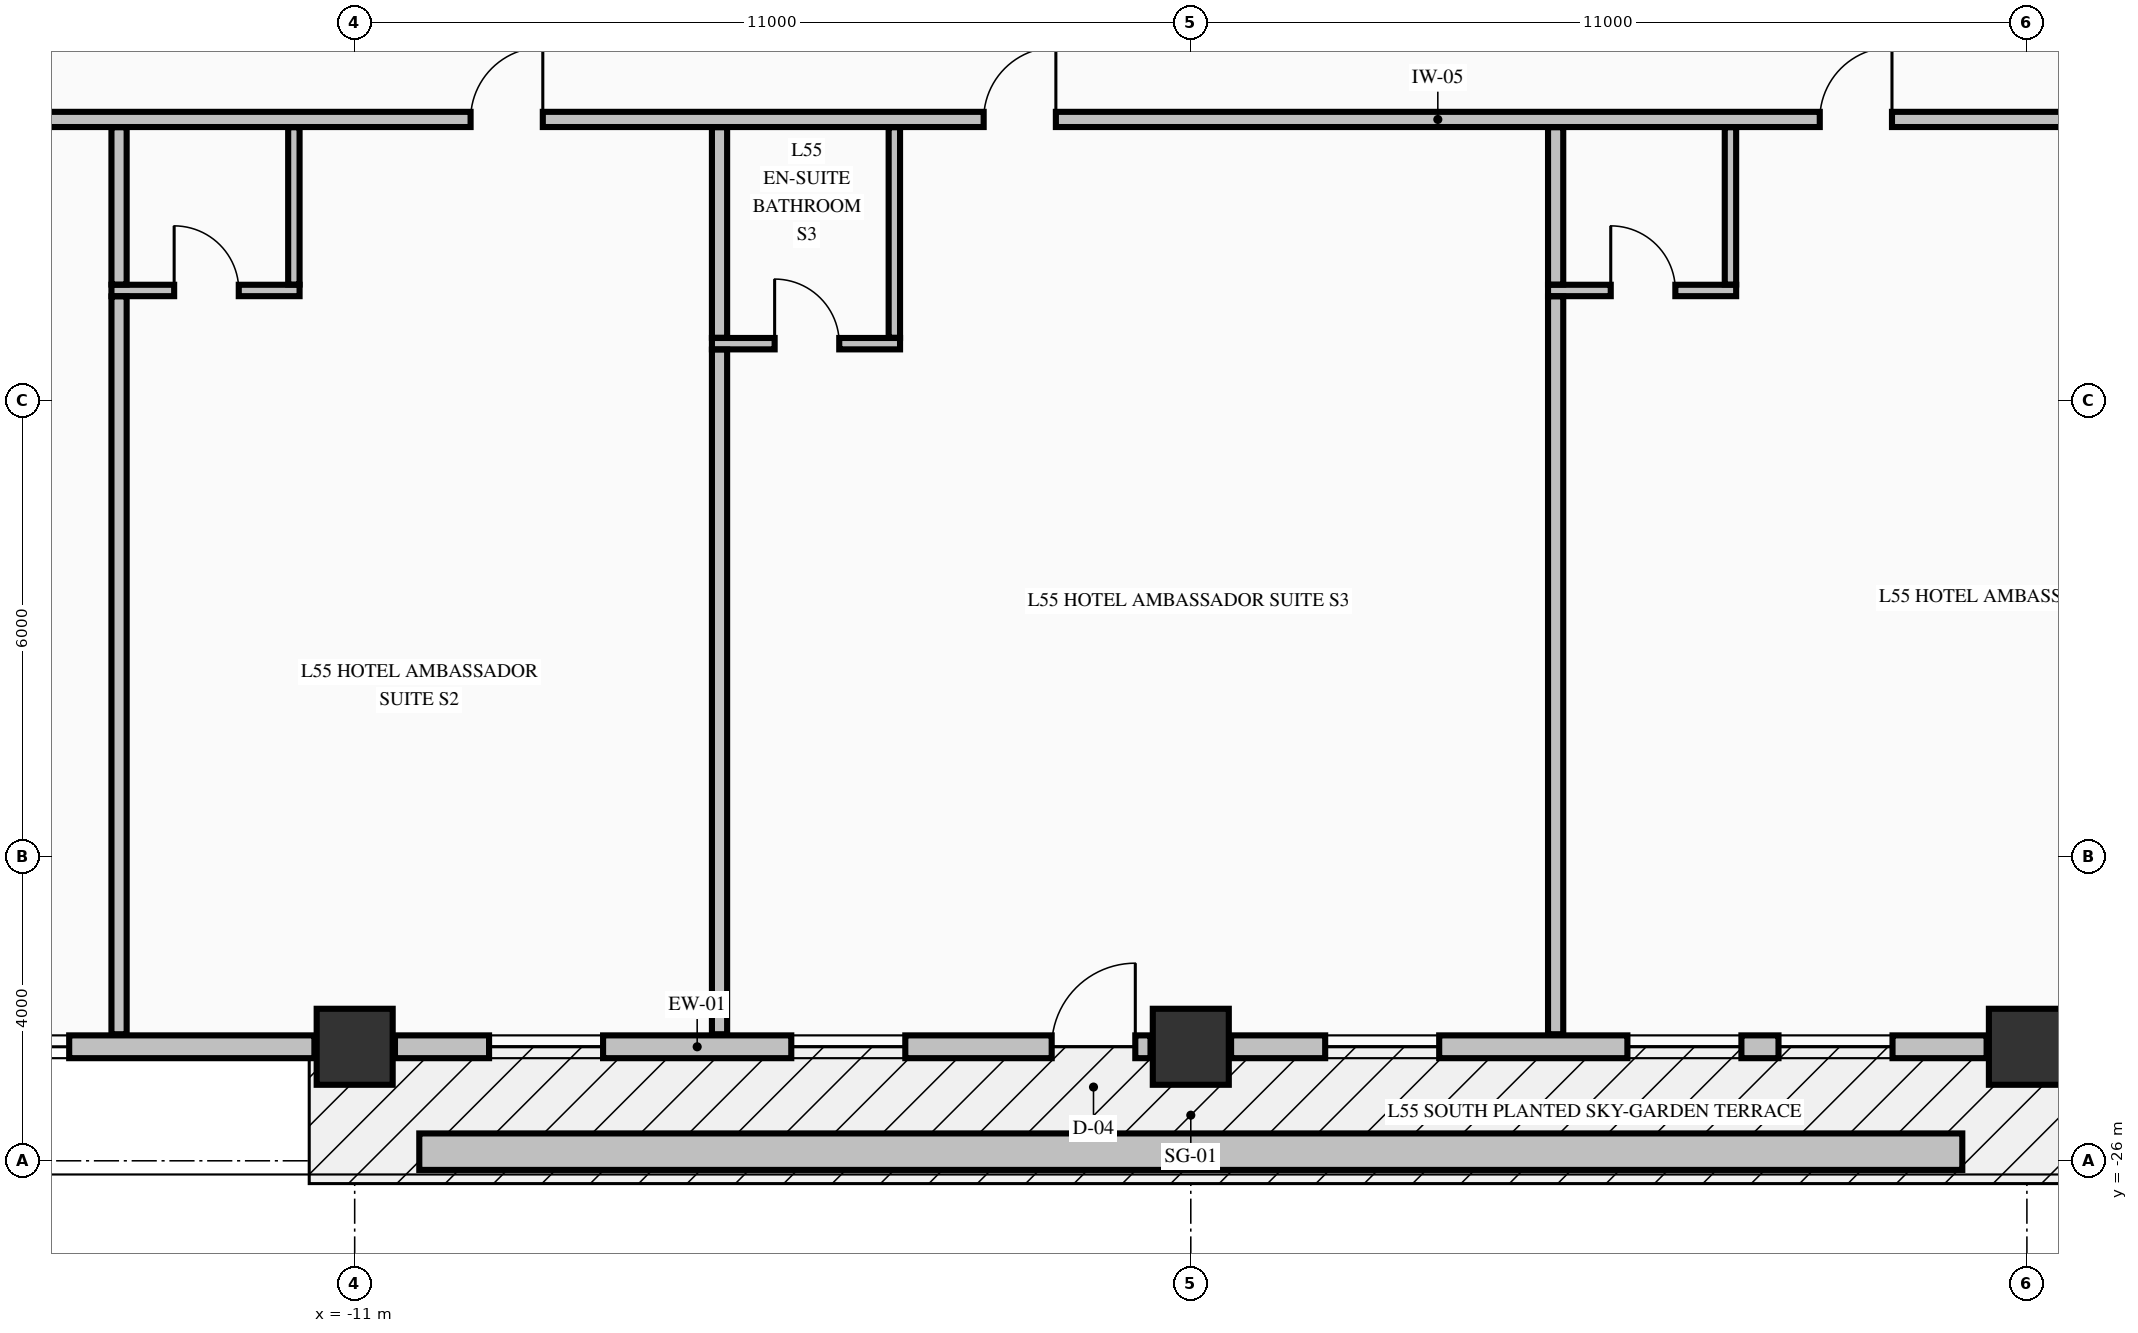
"""IFC4 building model, lengths in metres.
Left out: names, types, materials, properties, quantities, classifications, styles, units other than length and angle.
Written with IfcOpenShell. Run it as: python <this file> out.ifc"""

import sys

from ifc_helpers import new_model, si_unit, direction, frame, frame_2d, origin, origin_2d, place, context, subcontext, project, spatial, rectangle, extrude, element, fill, save


model = new_model("IFC4")
c1 = context("Model", 3, precision=1e-05, world=origin(), true_north=direction((0.0, 1.0)))
c2 = subcontext(c1, "Body", "Model", "MODEL_VIEW")
j1 = project(units=[si_unit("LENGTHUNIT", "METRE"), si_unit("PLANEANGLEUNIT", "RADIAN")], contexts=[c1])
p1 = place(None, origin())
s1 = spatial("IfcSite", under=j1, at=p1, CompositionType="ELEMENT")
p2 = place(p1, origin())
s2 = spatial("IfcBuilding", under=s1, at=p2, CompositionType="ELEMENT")
p3 = place(p2, frame((0.0, 0.0, 211.86)))
s3 = spatial("IfcBuildingStorey", under=s2, at=p3, CompositionType="ELEMENT", Elevation=211.86)
for number, where, z_axis, x_axis in (
    (1, (-11.0, -24.5, -0.325), (0.0, 0.0, 1.0), (1.0, 0.0, 0.0)),
    (2, (0.0, -24.5, -0.325), (0.0, 0.0, 1.0), (1.0, 0.0, 0.0)),
    (3, (11.0, -24.5, -0.325), (0.0, 0.0, 1.0), (1.0, 0.0, 0.0)),
):
    element("IfcColumn", number, at=place(p3, frame(where, z_axis=z_axis, x_axis=x_axis)), inside=s3, PredefinedType="COLUMN", context=c2, shape_type="SweptSolid", body=[
        extrude(rectangle(XDim=1.0, YDim=1.0, at=origin_2d()), origin(), (0.0, 0.0, 1.0), 3.475),
    ])
p4 = place(p3, frame((-21.47, -24.5, 0.0), z_axis=(0.0, 0.0, 1.0), x_axis=(1.0, 0.0, 0.0)))
e4 = element("IfcWall", 4, at=p4, inside=s3, PredefinedType="STANDARD", context=c2, shape_type="SweptSolid", body=[
    extrude(rectangle(XDim=9.94, YDim=0.3, at=frame_2d((4.97, 0.0))), origin(), (0.0, 0.0, 1.0), 2.542),
])
p5 = place(p4, frame((3.226, 0.0, 0.72)))
e5 = element("IfcOpeningElement", 5, at=p5, cuts=e4, PredefinedType="OPENING", context=c2, shape_type="SweptSolid", body=[
    extrude(rectangle(XDim=1.5, YDim=1.6, at=frame_2d((0.75, 0.8))), frame((0.0, 0.16, 0.0), z_axis=(0.0, -1.0, 0.0), x_axis=(1.0, 0.0, 0.0)), (0.0, 0.0, 1.0), 0.32),
])
p6 = place(p4, frame((5.214, 0.0, 0.72)))
e6 = element("IfcOpeningElement", 6, at=p6, cuts=e4, PredefinedType="OPENING", context=c2, shape_type="SweptSolid", body=[
    extrude(rectangle(XDim=1.5, YDim=1.6, at=frame_2d((0.75, 0.8))), frame((0.0, 0.16, 0.0), z_axis=(0.0, -1.0, 0.0), x_axis=(1.0, 0.0, 0.0)), (0.0, 0.0, 1.0), 0.32),
])
p7 = place(p3, frame((-10.47, -24.5, 0.0), z_axis=(0.0, 0.0, 1.0), x_axis=(1.0, 0.0, 0.0)))
e7 = element("IfcWall", 7, at=p7, inside=s3, PredefinedType="STANDARD", context=c2, shape_type="SweptSolid", body=[
    extrude(rectangle(XDim=9.94, YDim=0.3, at=frame_2d((4.97, 0.0))), origin(), (0.0, 0.0, 1.0), 2.542),
])
p8 = place(p7, frame((8.64, 0.0, 0.0)))
e8 = element("IfcOpeningElement", 8, at=p8, cuts=e7, PredefinedType="OPENING", context=c2, shape_type="SweptSolid", body=[
    extrude(rectangle(XDim=1.1, YDim=2.15, at=frame_2d((0.55, 1.075))), frame((0.0, 0.16, 0.0), z_axis=(0.0, -1.0, 0.0), x_axis=(1.0, 0.0, 0.0)), (0.0, 0.0, 1.0), 0.32),
])
p9 = place(p7, frame((1.238, 0.0, 0.72)))
e9 = element("IfcOpeningElement", 9, at=p9, cuts=e7, PredefinedType="OPENING", context=c2, shape_type="SweptSolid", body=[
    extrude(rectangle(XDim=1.5, YDim=1.6, at=frame_2d((0.75, 0.8))), frame((0.0, 0.16, 0.0), z_axis=(0.0, -1.0, 0.0), x_axis=(1.0, 0.0, 0.0)), (0.0, 0.0, 1.0), 0.32),
])
p10 = place(p7, frame((5.214, 0.0, 0.72)))
e10 = element("IfcOpeningElement", 10, at=p10, cuts=e7, PredefinedType="OPENING", context=c2, shape_type="SweptSolid", body=[
    extrude(rectangle(XDim=1.5, YDim=1.6, at=frame_2d((0.75, 0.8))), frame((0.0, 0.16, 0.0), z_axis=(0.0, -1.0, 0.0), x_axis=(1.0, 0.0, 0.0)), (0.0, 0.0, 1.0), 0.32),
])
p11 = place(p3, frame((0.53, -24.5, 0.0), z_axis=(0.0, 0.0, 1.0), x_axis=(1.0, 0.0, 0.0)))
e11 = element("IfcWall", 11, at=p11, inside=s3, PredefinedType="STANDARD", context=c2, shape_type="SweptSolid", body=[
    extrude(rectangle(XDim=9.94, YDim=0.3, at=frame_2d((4.97, 0.0))), origin(), (0.0, 0.0, 1.0), 2.542),
])
p12 = place(p11, frame((1.238, 0.0, 0.72)))
e12 = element("IfcOpeningElement", 12, at=p12, cuts=e11, PredefinedType="OPENING", context=c2, shape_type="SweptSolid", body=[
    extrude(rectangle(XDim=1.5, YDim=1.6, at=frame_2d((0.75, 0.8))), frame((0.0, 0.16, 0.0), z_axis=(0.0, -1.0, 0.0), x_axis=(1.0, 0.0, 0.0)), (0.0, 0.0, 1.0), 0.32),
])
p13 = place(p11, frame((5.214, 0.0, 0.72)))
e13 = element("IfcOpeningElement", 13, at=p13, cuts=e11, PredefinedType="OPENING", context=c2, shape_type="SweptSolid", body=[
    extrude(rectangle(XDim=1.5, YDim=1.6, at=frame_2d((0.75, 0.8))), frame((0.0, 0.16, 0.0), z_axis=(0.0, -1.0, 0.0), x_axis=(1.0, 0.0, 0.0)), (0.0, 0.0, 1.0), 0.32),
])
p14 = place(p11, frame((7.202, 0.0, 0.72)))
e14 = element("IfcOpeningElement", 14, at=p14, cuts=e11, PredefinedType="OPENING", context=c2, shape_type="SweptSolid", body=[
    extrude(rectangle(XDim=1.5, YDim=1.6, at=frame_2d((0.75, 0.8))), frame((0.0, 0.16, 0.0), z_axis=(0.0, -1.0, 0.0), x_axis=(1.0, 0.0, 0.0)), (0.0, 0.0, 1.0), 0.32),
])
p15 = place(p3, frame((-6.3, -15.25, 0.0), z_axis=(0.0, 0.0, 1.0), x_axis=(1.0, 0.0, 0.0)))
e15 = element("IfcWall", 15, at=p15, inside=s3, PredefinedType="PARTITIONING", context=c2, shape_type="SweptSolid", body=[
    extrude(rectangle(XDim=2.475, YDim=0.15, at=frame_2d((1.238, 0.0))), origin(), (0.0, 0.0, 1.0), 3.15),
])
p16 = place(p15, frame((0.825, 0.0, 0.0)))
e16 = element("IfcOpeningElement", 16, at=p16, cuts=e15, PredefinedType="OPENING", context=c2, shape_type="SweptSolid", body=[
    extrude(rectangle(XDim=0.85, YDim=2.1, at=frame_2d((0.425, 1.05))), frame((0.0, 0.085, 0.0), z_axis=(0.0, -1.0, 0.0), x_axis=(1.0, 0.0, 0.0)), (0.0, 0.0, 1.0), 0.17),
])
p17 = place(p3, frame((-14.2, -14.55, 0.0), z_axis=(0.0, 0.0, 1.0), x_axis=(1.0, 0.0, 0.0)))
e17 = element("IfcWall", 17, at=p17, inside=s3, PredefinedType="PARTITIONING", context=c2, shape_type="SweptSolid", body=[
    extrude(rectangle(XDim=2.475, YDim=0.15, at=frame_2d((1.237, 0.0))), origin(), (0.0, 0.0, 1.0), 3.15),
])
p18 = place(p17, frame((0.825, 0.0, 0.0)))
e18 = element("IfcOpeningElement", 18, at=p18, cuts=e17, PredefinedType="OPENING", context=c2, shape_type="SweptSolid", body=[
    extrude(rectangle(XDim=0.85, YDim=2.1, at=frame_2d((0.425, 1.05))), frame((0.0, 0.085, 0.0), z_axis=(0.0, -1.0, 0.0), x_axis=(1.0, 0.0, 0.0)), (0.0, 0.0, 1.0), 0.17),
])
p19 = place(p3, frame((4.7, -14.55, 0.0), z_axis=(0.0, 0.0, 1.0), x_axis=(1.0, 0.0, 0.0)))
e19 = element("IfcWall", 19, at=p19, inside=s3, PredefinedType="PARTITIONING", context=c2, shape_type="SweptSolid", body=[
    extrude(rectangle(XDim=2.475, YDim=0.15, at=frame_2d((1.238, 0.0))), origin(), (0.0, 0.0, 1.0), 3.15),
])
p20 = place(p19, frame((0.825, 0.0, 0.0)))
e20 = element("IfcOpeningElement", 20, at=p20, cuts=e19, PredefinedType="OPENING", context=c2, shape_type="SweptSolid", body=[
    extrude(rectangle(XDim=0.85, YDim=2.1, at=frame_2d((0.425, 1.05))), frame((0.0, 0.085, 0.0), z_axis=(0.0, -1.0, 0.0), x_axis=(1.0, 0.0, 0.0)), (0.0, 0.0, 1.0), 0.17),
])
p21 = place(p3, frame((-22.1, -12.3, 0.0), z_axis=(0.0, 0.0, 1.0), x_axis=(1.0, 0.0, 0.0)))
e21 = element("IfcWall", 21, at=p21, inside=s3, PredefinedType="PARTITIONING", context=c2, shape_type="SweptSolid", body=[
    extrude(rectangle(XDim=39.2, YDim=0.2, at=frame_2d((19.6, 0.0))), origin(), (0.0, 0.0, 1.0), 3.15),
])
p22 = place(p21, frame((4.725, 0.0, 0.0)))
e22 = element("IfcOpeningElement", 22, at=p22, cuts=e21, PredefinedType="OPENING", context=c2, shape_type="SweptSolid", body=[
    extrude(rectangle(XDim=0.95, YDim=2.15, at=frame_2d((0.475, 1.075))), frame((0.0, 0.11, 0.0), z_axis=(0.0, -1.0, 0.0), x_axis=(1.0, 0.0, 0.0)), (0.0, 0.0, 1.0), 0.22),
])
p23 = place(p21, frame((12.625, 0.0, 0.0)))
e23 = element("IfcOpeningElement", 23, at=p23, cuts=e21, PredefinedType="OPENING", context=c2, shape_type="SweptSolid", body=[
    extrude(rectangle(XDim=0.95, YDim=2.15, at=frame_2d((0.475, 1.075))), frame((0.0, 0.11, 0.0), z_axis=(0.0, -1.0, 0.0), x_axis=(1.0, 0.0, 0.0)), (0.0, 0.0, 1.0), 0.22),
])
p24 = place(p21, frame((19.375, 0.0, 0.0)))
e24 = element("IfcOpeningElement", 24, at=p24, cuts=e21, PredefinedType="OPENING", context=c2, shape_type="SweptSolid", body=[
    extrude(rectangle(XDim=0.95, YDim=2.15, at=frame_2d((0.475, 1.075))), frame((0.0, 0.11, 0.0), z_axis=(0.0, -1.0, 0.0), x_axis=(1.0, 0.0, 0.0)), (0.0, 0.0, 1.0), 0.22),
])
p25 = place(p21, frame((30.375, 0.0, 0.0)))
e25 = element("IfcOpeningElement", 25, at=p25, cuts=e21, PredefinedType="OPENING", context=c2, shape_type="SweptSolid", body=[
    extrude(rectangle(XDim=0.95, YDim=2.15, at=frame_2d((0.475, 1.075))), frame((0.0, 0.11, 0.0), z_axis=(0.0, -1.0, 0.0), x_axis=(1.0, 0.0, 0.0)), (0.0, 0.0, 1.0), 0.22),
])
p26 = place(p3, frame((-14.1, -24.335, 0.0), z_axis=(0.0, 0.0, 1.0), x_axis=(0.0, 1.0, 0.0)))
e26 = element("IfcWall", 26, at=p26, inside=s3, PredefinedType="PARTITIONING", context=c2, shape_type="SweptSolid", body=[
    extrude(rectangle(XDim=9.707, YDim=0.2, at=frame_2d((4.854, 0.0))), origin(), (0.0, 0.0, 1.0), 3.15),
])
p27 = place(p3, frame((-14.1, -14.472, 0.0), z_axis=(0.0, 0.0, 1.0), x_axis=(0.0, 1.0, 0.0)))
e27 = element("IfcWall", 27, at=p27, inside=s3, PredefinedType="PARTITIONING", context=c2, shape_type="SweptSolid", body=[
    extrude(rectangle(XDim=2.069, YDim=0.2, at=frame_2d((1.034, 0.0))), origin(), (0.0, 0.0, 1.0), 3.15),
])
p28 = place(p3, frame((-11.8, -14.472, 0.0), z_axis=(0.0, 0.0, 1.0), x_axis=(0.0, 1.0, 0.0)))
e28 = element("IfcWall", 28, at=p28, inside=s3, PredefinedType="PARTITIONING", context=c2, shape_type="SweptSolid", body=[
    extrude(rectangle(XDim=2.069, YDim=0.15, at=frame_2d((1.034, 0.0))), origin(), (0.0, 0.0, 1.0), 3.15),
])
p29 = place(p3, frame((-6.2, -24.335, 0.0), z_axis=(0.0, 0.0, 1.0), x_axis=(0.0, 1.0, 0.0)))
e29 = element("IfcWall", 29, at=p29, inside=s3, PredefinedType="PARTITIONING", context=c2, shape_type="SweptSolid", body=[
    extrude(rectangle(XDim=9.007, YDim=0.2, at=frame_2d((4.503, 0.0))), origin(), (0.0, 0.0, 1.0), 3.15),
])
p30 = place(p3, frame((-6.2, -15.172, 0.0), z_axis=(0.0, 0.0, 1.0), x_axis=(0.0, 1.0, 0.0)))
e30 = element("IfcWall", 30, at=p30, inside=s3, PredefinedType="PARTITIONING", context=c2, shape_type="SweptSolid", body=[
    extrude(rectangle(XDim=2.769, YDim=0.2, at=frame_2d((1.385, 0.0))), origin(), (0.0, 0.0, 1.0), 3.15),
])
p31 = place(p3, frame((-3.9, -15.172, 0.0), z_axis=(0.0, 0.0, 1.0), x_axis=(0.0, 1.0, 0.0)))
e31 = element("IfcWall", 31, at=p31, inside=s3, PredefinedType="PARTITIONING", context=c2, shape_type="SweptSolid", body=[
    extrude(rectangle(XDim=2.769, YDim=0.15, at=frame_2d((1.385, 0.0))), origin(), (0.0, 0.0, 1.0), 3.15),
])
p32 = place(p3, frame((4.8, -24.335, 0.0), z_axis=(0.0, 0.0, 1.0), x_axis=(0.0, 1.0, 0.0)))
e32 = element("IfcWall", 32, at=p32, inside=s3, PredefinedType="PARTITIONING", context=c2, shape_type="SweptSolid", body=[
    extrude(rectangle(XDim=9.707, YDim=0.2, at=frame_2d((4.854, 0.0))), origin(), (0.0, 0.0, 1.0), 3.15),
])
p33 = place(p3, frame((4.8, -14.472, 0.0), z_axis=(0.0, 0.0, 1.0), x_axis=(0.0, 1.0, 0.0)))
e33 = element("IfcWall", 33, at=p33, inside=s3, PredefinedType="PARTITIONING", context=c2, shape_type="SweptSolid", body=[
    extrude(rectangle(XDim=2.069, YDim=0.2, at=frame_2d((1.034, 0.0))), origin(), (0.0, 0.0, 1.0), 3.15),
])
p34 = place(p3, frame((7.1, -14.472, 0.0), z_axis=(0.0, 0.0, 1.0), x_axis=(0.0, 1.0, 0.0)))
e34 = element("IfcWall", 34, at=p34, inside=s3, PredefinedType="PARTITIONING", context=c2, shape_type="SweptSolid", body=[
    extrude(rectangle(XDim=2.069, YDim=0.15, at=frame_2d((1.034, 0.0))), origin(), (0.0, 0.0, 1.0), 3.15),
])
p35 = place(p3, frame((-10.15, -25.88, -0.04), z_axis=(0.0, 0.0, 1.0), x_axis=(1.0, 0.0, 0.0)))
e35 = element("IfcWall", 35, at=p35, inside=s3, PredefinedType="PARAPET", context=c2, shape_type="SweptSolid", body=[
    extrude(rectangle(XDim=20.3, YDim=0.48, at=frame_2d((10.15, 0.0))), origin(), (0.0, 0.0, 1.0), 0.52),
])
p36 = place(p6, origin())
e36 = element("IfcWindow", 36, at=p36, inside=s3, PartitioningType="SINGLE_PANEL", PredefinedType="WINDOW", context=c2, shape_type="SweptSolid", body=[
    extrude(rectangle(XDim=1.5, YDim=1.6, at=frame_2d((0.75, 0.8))), frame((0.0, 0.03, 0.0), z_axis=(0.0, -1.0, 0.0), x_axis=(1.0, 0.0, 0.0)), (0.0, 0.0, 1.0), 0.06),
])
fill(e6, e36)
p37 = place(p8, origin())
e37 = element("IfcDoor", 37, at=p37, inside=s3, OperationType="SINGLE_SWING_RIGHT", PredefinedType="DOOR", context=c2, shape_type="SweptSolid", body=[
    extrude(rectangle(XDim=1.1, YDim=2.15, at=frame_2d((0.55, 1.075))), frame((0.0, 0.025, 0.0), z_axis=(0.0, -1.0, 0.0), x_axis=(1.0, 0.0, 0.0)), (0.0, 0.0, 1.0), 0.05),
])
fill(e8, e37)
p38 = place(p9, origin())
e38 = element("IfcWindow", 38, at=p38, inside=s3, PartitioningType="SINGLE_PANEL", PredefinedType="WINDOW", context=c2, shape_type="SweptSolid", body=[
    extrude(rectangle(XDim=1.5, YDim=1.6, at=frame_2d((0.75, 0.8))), frame((0.0, 0.03, 0.0), z_axis=(0.0, -1.0, 0.0), x_axis=(1.0, 0.0, 0.0)), (0.0, 0.0, 1.0), 0.06),
])
fill(e9, e38)
p39 = place(p10, origin())
e39 = element("IfcWindow", 39, at=p39, inside=s3, PartitioningType="SINGLE_PANEL", PredefinedType="WINDOW", context=c2, shape_type="SweptSolid", body=[
    extrude(rectangle(XDim=1.5, YDim=1.6, at=frame_2d((0.75, 0.8))), frame((0.0, 0.03, 0.0), z_axis=(0.0, -1.0, 0.0), x_axis=(1.0, 0.0, 0.0)), (0.0, 0.0, 1.0), 0.06),
])
fill(e10, e39)
p40 = place(p12, origin())
e40 = element("IfcWindow", 40, at=p40, inside=s3, PartitioningType="SINGLE_PANEL", PredefinedType="WINDOW", context=c2, shape_type="SweptSolid", body=[
    extrude(rectangle(XDim=1.5, YDim=1.6, at=frame_2d((0.75, 0.8))), frame((0.0, 0.03, 0.0), z_axis=(0.0, -1.0, 0.0), x_axis=(1.0, 0.0, 0.0)), (0.0, 0.0, 1.0), 0.06),
])
fill(e12, e40)
p41 = place(p13, origin())
e41 = element("IfcWindow", 41, at=p41, inside=s3, PartitioningType="SINGLE_PANEL", PredefinedType="WINDOW", context=c2, shape_type="SweptSolid", body=[
    extrude(rectangle(XDim=1.5, YDim=1.6, at=frame_2d((0.75, 0.8))), frame((0.0, 0.03, 0.0), z_axis=(0.0, -1.0, 0.0), x_axis=(1.0, 0.0, 0.0)), (0.0, 0.0, 1.0), 0.06),
])
fill(e13, e41)
p42 = place(p14, origin())
e42 = element("IfcWindow", 42, at=p42, inside=s3, PartitioningType="SINGLE_PANEL", PredefinedType="WINDOW", context=c2, shape_type="SweptSolid", body=[
    extrude(rectangle(XDim=1.5, YDim=1.6, at=frame_2d((0.75, 0.8))), frame((0.0, 0.03, 0.0), z_axis=(0.0, -1.0, 0.0), x_axis=(1.0, 0.0, 0.0)), (0.0, 0.0, 1.0), 0.06),
])
fill(e14, e42)
p43 = place(p23, origin())
e43 = element("IfcDoor", 43, at=p43, inside=s3, OperationType="SINGLE_SWING_RIGHT", PredefinedType="DOOR", context=c2, shape_type="SweptSolid", body=[
    extrude(rectangle(XDim=0.95, YDim=2.15, at=frame_2d((0.475, 1.075))), frame((0.0, 0.025, 0.0), z_axis=(0.0, -1.0, 0.0), x_axis=(1.0, 0.0, 0.0)), (0.0, 0.0, 1.0), 0.05),
])
fill(e23, e43)
p44 = place(p18, origin())
e44 = element("IfcDoor", 44, at=p44, inside=s3, OperationType="SINGLE_SWING_LEFT", PredefinedType="DOOR", context=c2, shape_type="SweptSolid", body=[
    extrude(rectangle(XDim=0.85, YDim=2.1, at=frame_2d((0.425, 1.05))), frame((0.0, 0.025, 0.0), z_axis=(0.0, -1.0, 0.0), x_axis=(1.0, 0.0, 0.0)), (0.0, 0.0, 1.0), 0.05),
])
fill(e18, e44)
p45 = place(p24, origin())
e45 = element("IfcDoor", 45, at=p45, inside=s3, OperationType="SINGLE_SWING_RIGHT", PredefinedType="DOOR", context=c2, shape_type="SweptSolid", body=[
    extrude(rectangle(XDim=0.95, YDim=2.15, at=frame_2d((0.475, 1.075))), frame((0.0, 0.025, 0.0), z_axis=(0.0, -1.0, 0.0), x_axis=(1.0, 0.0, 0.0)), (0.0, 0.0, 1.0), 0.05),
])
fill(e24, e45)
p46 = place(p16, origin())
e46 = element("IfcDoor", 46, at=p46, inside=s3, OperationType="SINGLE_SWING_LEFT", PredefinedType="DOOR", context=c2, shape_type="SweptSolid", body=[
    extrude(rectangle(XDim=0.85, YDim=2.1, at=frame_2d((0.425, 1.05))), frame((0.0, 0.025, 0.0), z_axis=(0.0, -1.0, 0.0), x_axis=(1.0, 0.0, 0.0)), (0.0, 0.0, 1.0), 0.05),
])
fill(e16, e46)
p47 = place(p25, origin())
e47 = element("IfcDoor", 47, at=p47, inside=s3, OperationType="SINGLE_SWING_RIGHT", PredefinedType="DOOR", context=c2, shape_type="SweptSolid", body=[
    extrude(rectangle(XDim=0.95, YDim=2.15, at=frame_2d((0.475, 1.075))), frame((0.0, 0.025, 0.0), z_axis=(0.0, -1.0, 0.0), x_axis=(1.0, 0.0, 0.0)), (0.0, 0.0, 1.0), 0.05),
])
fill(e25, e47)
p48 = place(p20, origin())
e48 = element("IfcDoor", 48, at=p48, inside=s3, OperationType="SINGLE_SWING_LEFT", PredefinedType="DOOR", context=c2, shape_type="SweptSolid", body=[
    extrude(rectangle(XDim=0.85, YDim=2.1, at=frame_2d((0.425, 1.05))), frame((0.0, 0.025, 0.0), z_axis=(0.0, -1.0, 0.0), x_axis=(1.0, 0.0, 0.0)), (0.0, 0.0, 1.0), 0.05),
])
fill(e20, e48)
save(model, sys.argv[1])
